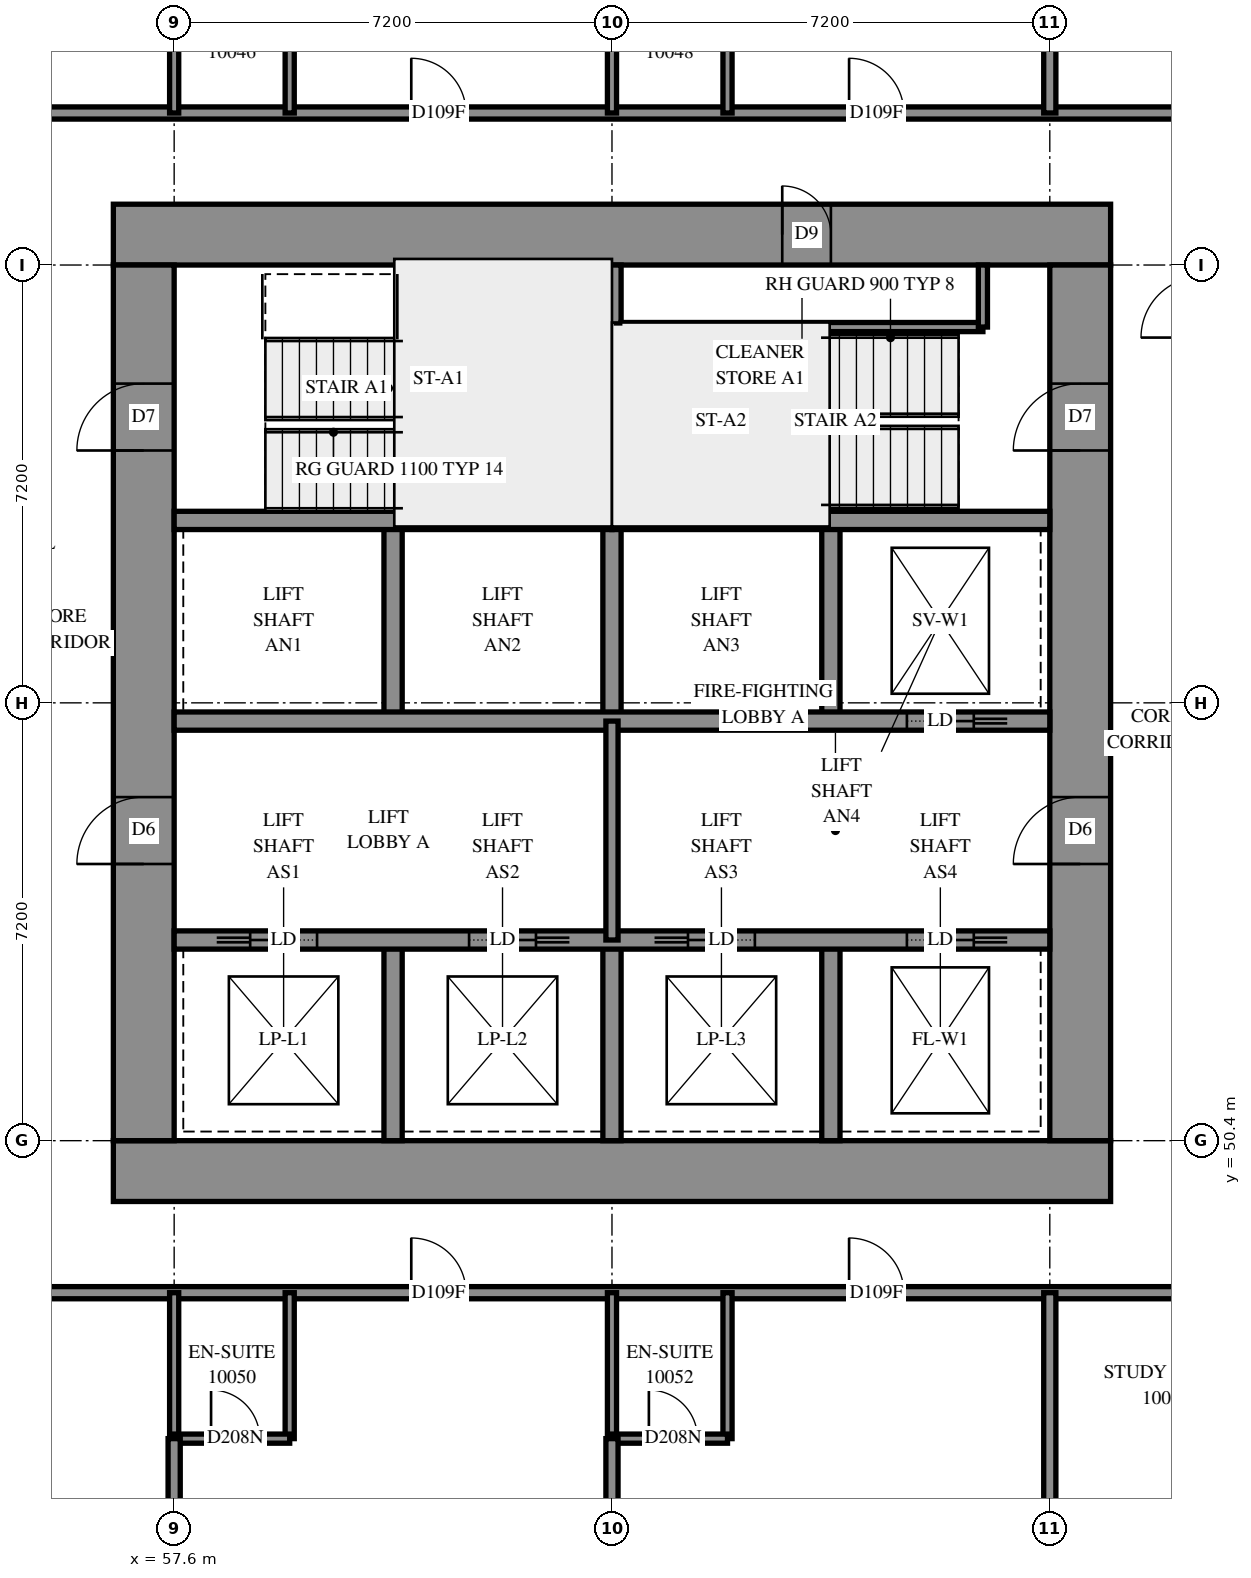
"""IFC4 building model, lengths in metres.
Left out: names, types, materials, properties, quantities, classifications, styles, units other than length and angle.
Written with IfcOpenShell. Run it as: python <this file> out.ifc"""

import sys

from ifc_helpers import new_model, si_unit, direction, frame, frame_2d, origin, place, context, subcontext, project, spatial, rectangle, extrude, element, fill, save


model = new_model("IFC4")
c1 = context("Model", 3, precision=1e-05, world=origin(), true_north=direction((0.0, 1.0)))
c2 = subcontext(c1, "Body", "Model", "MODEL_VIEW")
j1 = project(units=[si_unit("LENGTHUNIT", "METRE"), si_unit("PLANEANGLEUNIT", "RADIAN")], contexts=[c1])
p1 = place(None, origin())
s1 = spatial("IfcSite", under=j1, at=p1, CompositionType="ELEMENT")
p2 = place(p1, origin())
s2 = spatial("IfcBuilding", under=s1, at=p2, CompositionType="ELEMENT")
p3 = place(p2, frame((0.0, 0.0, 40.6)))
s3 = spatial("IfcBuildingStorey", under=s2, at=p3, CompositionType="ELEMENT", Elevation=40.6)
p4 = place(p3, frame((56.6, 49.9, -0.3), z_axis=(0.0, 0.0, 1.0), x_axis=(1.0, 0.0, 0.0)))
e1 = element("IfcWall", 1, at=p4, inside=s3, PredefinedType="SHEAR", context=c2, shape_type="SweptSolid", body=[
    extrude(rectangle(XDim=16.4, YDim=1.0, at=frame_2d((8.2, 0.0))), origin(), (0.0, 0.0, 1.0), 2.7),
])
p5 = place(p3, frame((56.6, 65.3, -0.3), z_axis=(0.0, 0.0, 1.0), x_axis=(1.0, 0.0, 0.0)))
e2 = element("IfcWall", 2, at=p5, inside=s3, PredefinedType="SHEAR", context=c2, shape_type="SweptSolid", body=[
    extrude(rectangle(XDim=16.4, YDim=1.0, at=frame_2d((8.2, 0.0))), origin(), (0.0, 0.0, 1.0), 2.7),
])
p6 = place(p5, frame((11.0, 0.0, 0.3)))
e3 = element("IfcOpeningElement", 3, at=p6, cuts=e2, PredefinedType="OPENING", context=c2, shape_type="SweptSolid", body=[
    extrude(rectangle(XDim=0.8, YDim=2.1, at=frame_2d((0.4, 1.05))), frame((0.0, 0.51, 0.0), z_axis=(0.0, -1.0, 0.0), x_axis=(1.0, 0.0, 0.0)), (0.0, 0.0, 1.0), 1.02),
])
p7 = place(p3, frame((57.1, 50.4, -0.3), z_axis=(0.0, 0.0, 1.0), x_axis=(0.0, 1.0, 0.0)))
e4 = element("IfcWall", 4, at=p7, inside=s3, PredefinedType="SHEAR", context=c2, shape_type="SweptSolid", body=[
    extrude(rectangle(XDim=14.4, YDim=1.0, at=frame_2d((7.2, 0.0))), origin(), (0.0, 0.0, 1.0), 2.7),
])
p8 = place(p7, frame((4.55, 0.0, 0.3)))
e5 = element("IfcOpeningElement", 5, at=p8, cuts=e4, PredefinedType="OPENING", context=c2, shape_type="SweptSolid", body=[
    extrude(rectangle(XDim=1.1, YDim=2.1, at=frame_2d((0.55, 1.05))), frame((0.0, 0.51, 0.0), z_axis=(0.0, -1.0, 0.0), x_axis=(1.0, 0.0, 0.0)), (0.0, 0.0, 1.0), 1.02),
])
p9 = place(p7, frame((11.35, 0.0, 0.3)))
e6 = element("IfcOpeningElement", 6, at=p9, cuts=e4, PredefinedType="OPENING", context=c2, shape_type="SweptSolid", body=[
    extrude(rectangle(XDim=1.1, YDim=2.1, at=frame_2d((0.55, 1.05))), frame((0.0, 0.51, 0.0), z_axis=(0.0, -1.0, 0.0), x_axis=(1.0, 0.0, 0.0)), (0.0, 0.0, 1.0), 1.02),
])
p10 = place(p3, frame((72.5, 50.4, -0.3), z_axis=(0.0, 0.0, 1.0), x_axis=(0.0, 1.0, 0.0)))
e7 = element("IfcWall", 7, at=p10, inside=s3, PredefinedType="SHEAR", context=c2, shape_type="SweptSolid", body=[
    extrude(rectangle(XDim=14.4, YDim=1.0, at=frame_2d((7.2, 0.0))), origin(), (0.0, 0.0, 1.0), 2.7),
])
p11 = place(p10, frame((4.55, 0.0, 0.3)))
e8 = element("IfcOpeningElement", 8, at=p11, cuts=e7, PredefinedType="OPENING", context=c2, shape_type="SweptSolid", body=[
    extrude(rectangle(XDim=1.1, YDim=2.1, at=frame_2d((0.55, 1.05))), frame((0.0, 0.51, 0.0), z_axis=(0.0, -1.0, 0.0), x_axis=(1.0, 0.0, 0.0)), (0.0, 0.0, 1.0), 1.02),
])
p12 = place(p10, frame((11.35, 0.0, 0.3)))
e9 = element("IfcOpeningElement", 9, at=p12, cuts=e7, PredefinedType="OPENING", context=c2, shape_type="SweptSolid", body=[
    extrude(rectangle(XDim=1.1, YDim=2.1, at=frame_2d((0.55, 1.05))), frame((0.0, 0.51, 0.0), z_axis=(0.0, -1.0, 0.0), x_axis=(1.0, 0.0, 0.0)), (0.0, 0.0, 1.0), 1.02),
])
for number, where, z_axis, x_axis in (
    (10, (61.2, 50.4, 0.0), (0.0, 0.0, 1.0), (0.0, 1.0, 0.0)),
    (11, (61.2, 57.3, 0.0), (0.0, 0.0, 1.0), (0.0, 1.0, 0.0)),
    (12, (64.8, 50.4, 0.0), (0.0, 0.0, 1.0), (0.0, 1.0, 0.0)),
    (13, (64.8, 57.3, 0.0), (0.0, 0.0, 1.0), (0.0, 1.0, 0.0)),
    (14, (68.4, 50.4, 0.0), (0.0, 0.0, 1.0), (0.0, 1.0, 0.0)),
    (15, (68.4, 57.3, 0.0), (0.0, 0.0, 1.0), (0.0, 1.0, 0.0)),
):
    element("IfcWall", number, at=place(p3, frame(where, z_axis=z_axis, x_axis=x_axis)), inside=s3, PredefinedType="SOLIDWALL", context=c2, shape_type="SweptSolid", body=[
        extrude(rectangle(XDim=3.3, YDim=0.3, at=frame_2d((1.65, 0.0))), origin(), (0.0, 0.0, 1.0), 3.1),
    ])
p13 = place(p3, frame((57.6, 53.7, 0.0), z_axis=(0.0, 0.0, 1.0), x_axis=(1.0, 0.0, 0.0)))
e16 = element("IfcWall", 16, at=p13, inside=s3, PredefinedType="SOLIDWALL", context=c2, shape_type="SweptSolid", body=[
    extrude(rectangle(XDim=14.4, YDim=0.3, at=frame_2d((7.2, 0.0))), origin(), (0.0, 0.0, 1.0), 3.1),
])
p14 = place(p13, frame((1.25, 0.0, 0.0)))
e17 = element("IfcOpeningElement", 17, at=p14, cuts=e16, PredefinedType="OPENING", context=c2, shape_type="SweptSolid", body=[
    extrude(rectangle(XDim=1.1, YDim=2.1, at=frame_2d((0.55, 1.05))), frame((0.0, 0.16, 0.0), z_axis=(0.0, -1.0, 0.0), x_axis=(1.0, 0.0, 0.0)), (0.0, 0.0, 1.0), 0.32),
])
p15 = place(p13, frame((4.85, 0.0, 0.0)))
e18 = element("IfcOpeningElement", 18, at=p15, cuts=e16, PredefinedType="OPENING", context=c2, shape_type="SweptSolid", body=[
    extrude(rectangle(XDim=1.1, YDim=2.1, at=frame_2d((0.55, 1.05))), frame((0.0, 0.16, 0.0), z_axis=(0.0, -1.0, 0.0), x_axis=(1.0, 0.0, 0.0)), (0.0, 0.0, 1.0), 0.32),
])
p16 = place(p13, frame((8.45, 0.0, 0.0)))
e19 = element("IfcOpeningElement", 19, at=p16, cuts=e16, PredefinedType="OPENING", context=c2, shape_type="SweptSolid", body=[
    extrude(rectangle(XDim=1.1, YDim=2.1, at=frame_2d((0.55, 1.05))), frame((0.0, 0.16, 0.0), z_axis=(0.0, -1.0, 0.0), x_axis=(1.0, 0.0, 0.0)), (0.0, 0.0, 1.0), 0.32),
])
p17 = place(p13, frame((12.05, 0.0, 0.0)))
e20 = element("IfcOpeningElement", 20, at=p17, cuts=e16, PredefinedType="OPENING", context=c2, shape_type="SweptSolid", body=[
    extrude(rectangle(XDim=1.1, YDim=2.1, at=frame_2d((0.55, 1.05))), frame((0.0, 0.16, 0.0), z_axis=(0.0, -1.0, 0.0), x_axis=(1.0, 0.0, 0.0)), (0.0, 0.0, 1.0), 0.32),
])
p18 = place(p3, frame((57.6, 57.3, 0.0), z_axis=(0.0, 0.0, 1.0), x_axis=(1.0, 0.0, 0.0)))
e21 = element("IfcWall", 21, at=p18, inside=s3, PredefinedType="SOLIDWALL", context=c2, shape_type="SweptSolid", body=[
    extrude(rectangle(XDim=14.4, YDim=0.3, at=frame_2d((7.2, 0.0))), origin(), (0.0, 0.0, 1.0), 3.1),
])
p19 = place(p18, frame((12.05, 0.0, 0.0)))
e22 = element("IfcOpeningElement", 22, at=p19, cuts=e21, PredefinedType="OPENING", context=c2, shape_type="SweptSolid", body=[
    extrude(rectangle(XDim=1.1, YDim=2.1, at=frame_2d((0.55, 1.05))), frame((0.0, 0.16, 0.0), z_axis=(0.0, -1.0, 0.0), x_axis=(1.0, 0.0, 0.0)), (0.0, 0.0, 1.0), 0.32),
])
for number, where, z_axis, x_axis in (
    (23, (57.6, 60.6, 0.0), (0.0, 0.0, 1.0), (1.0, 0.0, 0.0)),
    (24, (64.8, 60.6, 0.0), (0.0, 0.0, 1.0), (1.0, 0.0, 0.0)),
):
    element("IfcWall", number, at=place(p3, frame(where, z_axis=z_axis, x_axis=x_axis)), inside=s3, PredefinedType="SOLIDWALL", context=c2, shape_type="SweptSolid", body=[
        extrude(rectangle(XDim=7.2, YDim=0.3, at=frame_2d((3.6, 0.0))), origin(), (0.0, 0.0, 1.0), 3.1),
    ])
p20 = place(p3, frame((64.8, 60.6, 0.0), z_axis=(0.0, 0.0, 1.0), x_axis=(0.0, 1.0, 0.0)))
e25 = element("IfcWall", 25, at=p20, inside=s3, PredefinedType="SOLIDWALL", context=c2, shape_type="SweptSolid", body=[
    extrude(rectangle(XDim=4.2, YDim=0.3, at=frame_2d((2.1, 0.0))), origin(), (0.0, 0.0, 1.0), 3.1),
])
p21 = place(p3, frame((64.95, 63.78, 0.0), z_axis=(0.0, 0.0, 1.0), x_axis=(1.0, 0.0, 0.0)))
e26 = element("IfcWall", 26, at=p21, inside=s3, PredefinedType="PARTITIONING", context=c2, shape_type="SweptSolid", body=[
    extrude(rectangle(XDim=5.95, YDim=0.15, at=frame_2d((2.975, 0.0))), origin(), (0.0, 0.0, 1.0), 3.1),
])
p22 = place(p3, frame((70.9, 63.78, 0.0), z_axis=(0.0, 0.0, 1.0), x_axis=(0.0, 1.0, 0.0)))
e27 = element("IfcWall", 27, at=p22, inside=s3, PredefinedType="PARTITIONING", context=c2, shape_type="SweptSolid", body=[
    extrude(rectangle(XDim=1.02, YDim=0.15, at=frame_2d((0.51, 0.0))), origin(), (0.0, 0.0, 1.0), 3.1),
])
p23 = place(p3, frame((64.8, 53.7, 0.0), z_axis=(0.0, 0.0, 1.0), x_axis=(0.0, 1.0, 0.0)))
e28 = element("IfcWall", 28, at=p23, inside=s3, PredefinedType="PARTITIONING", context=c2, shape_type="SweptSolid", body=[
    extrude(rectangle(XDim=3.6, YDim=0.2, at=frame_2d((1.8, 0.0))), origin(), (0.0, 0.0, 1.0), 3.1),
])
p24 = place(p3, frame((55.1, 67.3, 0.0), z_axis=(0.0, 0.0, 1.0), x_axis=(1.0, 0.0, 0.0)))
e29 = element("IfcWall", 29, at=p24, inside=s3, PredefinedType="PARTITIONING", context=c2, shape_type="SweptSolid", body=[
    extrude(rectangle(XDim=19.4, YDim=0.2, at=frame_2d((9.7, 0.0))), origin(), (0.0, 0.0, 1.0), 3.1),
])
p25 = place(p24, frame((6.399, 0.0, 0.0)))
e30 = element("IfcOpeningElement", 30, at=p25, cuts=e29, PredefinedType="OPENING", context=c2, shape_type="SweptSolid", body=[
    extrude(rectangle(XDim=0.9, YDim=2.1, at=frame_2d((0.45, 1.05))), frame((0.0, 0.11, 0.0), z_axis=(0.0, -1.0, 0.0), x_axis=(1.0, 0.0, 0.0)), (0.0, 0.0, 1.0), 0.22),
])
p26 = place(p24, frame((13.599, 0.0, 0.0)))
e31 = element("IfcOpeningElement", 31, at=p26, cuts=e29, PredefinedType="OPENING", context=c2, shape_type="SweptSolid", body=[
    extrude(rectangle(XDim=0.9, YDim=2.1, at=frame_2d((0.45, 1.05))), frame((0.0, 0.11, 0.0), z_axis=(0.0, -1.0, 0.0), x_axis=(1.0, 0.0, 0.0)), (0.0, 0.0, 1.0), 0.22),
])
p27 = place(p3, frame((55.1, 47.9, 0.0), z_axis=(0.0, 0.0, 1.0), x_axis=(1.0, 0.0, 0.0)))
e32 = element("IfcWall", 32, at=p27, inside=s3, PredefinedType="PARTITIONING", context=c2, shape_type="SweptSolid", body=[
    extrude(rectangle(XDim=19.204, YDim=0.2, at=frame_2d((9.602, 0.0))), origin(), (0.0, 0.0, 1.0), 3.1),
])
p28 = place(p27, frame((6.399, 0.0, 0.0)))
e33 = element("IfcOpeningElement", 33, at=p28, cuts=e32, PredefinedType="OPENING", context=c2, shape_type="SweptSolid", body=[
    extrude(rectangle(XDim=0.9, YDim=2.1, at=frame_2d((0.45, 1.05))), frame((0.0, 0.11, 0.0), z_axis=(0.0, -1.0, 0.0), x_axis=(1.0, 0.0, 0.0)), (0.0, 0.0, 1.0), 0.22),
])
p29 = place(p27, frame((13.599, 0.0, 0.0)))
e34 = element("IfcOpeningElement", 34, at=p29, cuts=e32, PredefinedType="OPENING", context=c2, shape_type="SweptSolid", body=[
    extrude(rectangle(XDim=0.9, YDim=2.1, at=frame_2d((0.45, 1.05))), frame((0.0, 0.11, 0.0), z_axis=(0.0, -1.0, 0.0), x_axis=(1.0, 0.0, 0.0)), (0.0, 0.0, 1.0), 0.22),
])
for number, where, z_axis, x_axis in (
    (35, (72.0, 67.3, 0.0), (0.0, 0.0, 1.0), (0.0, 1.0, 0.0)),
    (36, (72.0, 43.8, 0.0), (0.0, 0.0, 1.0), (0.0, 1.0, 0.0)),
):
    element("IfcWall", number, at=place(p3, frame(where, z_axis=z_axis, x_axis=x_axis)), inside=s3, PredefinedType="PARTITIONING", context=c2, shape_type="SweptSolid", body=[
        extrude(rectangle(XDim=4.1, YDim=0.2, at=frame_2d((2.05, 0.0))), origin(), (0.0, 0.0, 1.0), 3.1),
    ])
for number, where, z_axis, x_axis in (
    (37, (59.5, 67.3, 0.0), (0.0, 0.0, 1.0), (0.0, 1.0, 0.0)),
    (38, (57.6, 67.3, 0.0), (0.0, 0.0, 1.0), (0.0, 1.0, 0.0)),
    (39, (66.7, 67.3, 0.0), (0.0, 0.0, 1.0), (0.0, 1.0, 0.0)),
    (40, (64.8, 67.3, 0.0), (0.0, 0.0, 1.0), (0.0, 1.0, 0.0)),
    (41, (59.5, 45.5, 0.0), (0.0, 0.0, 1.0), (0.0, 1.0, 0.0)),
    (42, (57.6, 45.5, 0.0), (0.0, 0.0, 1.0), (0.0, 1.0, 0.0)),
    (43, (66.7, 45.5, 0.0), (0.0, 0.0, 1.0), (0.0, 1.0, 0.0)),
    (44, (64.8, 45.5, 0.0), (0.0, 0.0, 1.0), (0.0, 1.0, 0.0)),
):
    element("IfcWall", number, at=place(p3, frame(where, z_axis=z_axis, x_axis=x_axis)), inside=s3, PredefinedType="PARTITIONING", context=c2, shape_type="SweptSolid", body=[
        extrude(rectangle(XDim=2.4, YDim=0.15, at=frame_2d((1.2, 0.0))), origin(), (0.0, 0.0, 1.0), 3.1),
    ])
p30 = place(p3, frame((64.8, 45.5, 0.0), z_axis=(0.0, 0.0, 1.0), x_axis=(1.0, 0.0, 0.0)))
e45 = element("IfcWall", 45, at=p30, inside=s3, PredefinedType="PARTITIONING", context=c2, shape_type="SweptSolid", body=[
    extrude(rectangle(XDim=1.9, YDim=0.15, at=frame_2d((0.95, 0.0))), origin(), (0.0, 0.0, 1.0), 3.1),
])
p31 = place(p30, frame((0.607, 0.0, 0.0)))
e46 = element("IfcOpeningElement", 46, at=p31, cuts=e45, PredefinedType="OPENING", context=c2, shape_type="SweptSolid", body=[
    extrude(rectangle(XDim=0.8, YDim=2.1, at=frame_2d((0.4, 1.05))), frame((0.0, 0.085, 0.0), z_axis=(0.0, -1.0, 0.0), x_axis=(1.0, 0.0, 0.0)), (0.0, 0.0, 1.0), 0.17),
])
p32 = place(p3, frame((57.6, 45.5, 0.0), z_axis=(0.0, 0.0, 1.0), x_axis=(1.0, 0.0, 0.0)))
e47 = element("IfcWall", 47, at=p32, inside=s3, PredefinedType="PARTITIONING", context=c2, shape_type="SweptSolid", body=[
    extrude(rectangle(XDim=1.9, YDim=0.15, at=frame_2d((0.95, 0.0))), origin(), (0.0, 0.0, 1.0), 3.1),
])
p33 = place(p32, frame((0.607, 0.0, 0.0)))
e48 = element("IfcOpeningElement", 48, at=p33, cuts=e47, PredefinedType="OPENING", context=c2, shape_type="SweptSolid", body=[
    extrude(rectangle(XDim=0.8, YDim=2.1, at=frame_2d((0.4, 1.05))), frame((0.0, 0.085, 0.0), z_axis=(0.0, -1.0, 0.0), x_axis=(1.0, 0.0, 0.0)), (0.0, 0.0, 1.0), 0.17),
])
for number, where, z_axis, x_axis in (
    (49, (57.6, 43.8, 0.0), (0.0, 0.0, 1.0), (0.0, 1.0, 0.0)),
    (50, (64.8, 43.8, 0.0), (0.0, 0.0, 1.0), (0.0, 1.0, 0.0)),
):
    element("IfcWall", number, at=place(p3, frame(where, z_axis=z_axis, x_axis=x_axis)), inside=s3, PredefinedType="PARTITIONING", context=c2, shape_type="SweptSolid", body=[
        extrude(rectangle(XDim=1.7, YDim=0.2, at=frame_2d((0.85, 0.0))), origin(), (0.0, 0.0, 1.0), 3.1),
    ])
p34 = place(p6, origin())
e51 = element("IfcDoor", 51, at=p34, inside=s3, OperationType="SINGLE_SWING_RIGHT", PredefinedType="DOOR", context=c2, shape_type="SweptSolid", body=[
    extrude(rectangle(XDim=0.8, YDim=2.1, at=frame_2d((0.4, 1.05))), frame((0.0, -0.44, 0.0), z_axis=(0.0, -1.0, 0.0), x_axis=(1.0, 0.0, 0.0)), (0.0, 0.0, 1.0), 0.05),
])
fill(e3, e51)
p35 = place(p8, origin())
e52 = element("IfcDoor", 52, at=p35, inside=s3, OperationType="DOUBLE_DOOR_SINGLE_SWING", PredefinedType="DOOR", context=c2, shape_type="SweptSolid", body=[
    extrude(rectangle(XDim=1.1, YDim=2.1, at=frame_2d((0.55, 1.05))), frame((0.0, 0.025, 0.0), z_axis=(0.0, -1.0, 0.0), x_axis=(1.0, 0.0, 0.0)), (0.0, 0.0, 1.0), 0.05),
])
fill(e5, e52)
p36 = place(p11, origin())
e53 = element("IfcDoor", 53, at=p36, inside=s3, OperationType="DOUBLE_DOOR_SINGLE_SWING", PredefinedType="DOOR", context=c2, shape_type="SweptSolid", body=[
    extrude(rectangle(XDim=1.1, YDim=2.1, at=frame_2d((0.55, 1.05))), frame((0.0, 0.025, 0.0), z_axis=(0.0, -1.0, 0.0), x_axis=(1.0, 0.0, 0.0)), (0.0, 0.0, 1.0), 0.05),
])
fill(e8, e53)
p37 = place(p9, origin())
e54 = element("IfcDoor", 54, at=p37, inside=s3, OperationType="SINGLE_SWING_LEFT", PredefinedType="DOOR", context=c2, shape_type="SweptSolid", body=[
    extrude(rectangle(XDim=1.1, YDim=2.1, at=frame_2d((0.55, 1.05))), frame((0.0, 0.025, 0.0), z_axis=(0.0, -1.0, 0.0), x_axis=(1.0, 0.0, 0.0)), (0.0, 0.0, 1.0), 0.05),
])
fill(e6, e54)
p38 = place(p12, origin())
e55 = element("IfcDoor", 55, at=p38, inside=s3, OperationType="SINGLE_SWING_RIGHT", PredefinedType="DOOR", context=c2, shape_type="SweptSolid", body=[
    extrude(rectangle(XDim=1.1, YDim=2.1, at=frame_2d((0.55, 1.05))), frame((0.0, 0.025, 0.0), z_axis=(0.0, -1.0, 0.0), x_axis=(1.0, 0.0, 0.0)), (0.0, 0.0, 1.0), 0.05),
])
fill(e9, e55)
p39 = place(p14, origin())
e56 = element("IfcDoor", 56, at=p39, inside=s3, OperationType="SLIDING_TO_LEFT", PredefinedType="DOOR", context=c2, shape_type="SweptSolid", body=[
    extrude(rectangle(XDim=1.1, YDim=2.1, at=frame_2d((0.55, 1.05))), frame((0.0, 0.025, 0.0), z_axis=(0.0, -1.0, 0.0), x_axis=(1.0, 0.0, 0.0)), (0.0, 0.0, 1.0), 0.05),
])
fill(e17, e56)
p40 = place(p15, origin())
e57 = element("IfcDoor", 57, at=p40, inside=s3, OperationType="SLIDING_TO_RIGHT", PredefinedType="DOOR", context=c2, shape_type="SweptSolid", body=[
    extrude(rectangle(XDim=1.1, YDim=2.1, at=frame_2d((0.55, 1.05))), frame((0.0, 0.025, 0.0), z_axis=(0.0, -1.0, 0.0), x_axis=(1.0, 0.0, 0.0)), (0.0, 0.0, 1.0), 0.05),
])
fill(e18, e57)
p41 = place(p16, origin())
e58 = element("IfcDoor", 58, at=p41, inside=s3, OperationType="SLIDING_TO_LEFT", PredefinedType="DOOR", context=c2, shape_type="SweptSolid", body=[
    extrude(rectangle(XDim=1.1, YDim=2.1, at=frame_2d((0.55, 1.05))), frame((0.0, 0.025, 0.0), z_axis=(0.0, -1.0, 0.0), x_axis=(1.0, 0.0, 0.0)), (0.0, 0.0, 1.0), 0.05),
])
fill(e19, e58)
p42 = place(p17, origin())
e59 = element("IfcDoor", 59, at=p42, inside=s3, OperationType="SLIDING_TO_RIGHT", PredefinedType="DOOR", context=c2, shape_type="SweptSolid", body=[
    extrude(rectangle(XDim=1.1, YDim=2.1, at=frame_2d((0.55, 1.05))), frame((0.0, 0.025, 0.0), z_axis=(0.0, -1.0, 0.0), x_axis=(1.0, 0.0, 0.0)), (0.0, 0.0, 1.0), 0.05),
])
fill(e20, e59)
p43 = place(p19, origin())
e60 = element("IfcDoor", 60, at=p43, inside=s3, OperationType="SLIDING_TO_RIGHT", PredefinedType="DOOR", context=c2, shape_type="SweptSolid", body=[
    extrude(rectangle(XDim=1.1, YDim=2.1, at=frame_2d((0.55, 1.05))), frame((0.0, 0.025, 0.0), z_axis=(0.0, -1.0, 0.0), x_axis=(1.0, 0.0, 0.0)), (0.0, 0.0, 1.0), 0.05),
])
fill(e22, e60)
p44 = place(p25, origin())
e61 = element("IfcDoor", 61, at=p44, inside=s3, OperationType="SINGLE_SWING_RIGHT", PredefinedType="DOOR", context=c2, shape_type="SweptSolid", body=[
    extrude(rectangle(XDim=0.9, YDim=2.1, at=frame_2d((0.45, 1.05))), frame((0.0, 0.025, 0.0), z_axis=(0.0, -1.0, 0.0), x_axis=(1.0, 0.0, 0.0)), (0.0, 0.0, 1.0), 0.05),
])
fill(e30, e61)
p45 = place(p26, origin())
e62 = element("IfcDoor", 62, at=p45, inside=s3, OperationType="SINGLE_SWING_RIGHT", PredefinedType="DOOR", context=c2, shape_type="SweptSolid", body=[
    extrude(rectangle(XDim=0.9, YDim=2.1, at=frame_2d((0.45, 1.05))), frame((0.0, 0.025, 0.0), z_axis=(0.0, -1.0, 0.0), x_axis=(1.0, 0.0, 0.0)), (0.0, 0.0, 1.0), 0.05),
])
fill(e31, e62)
p46 = place(p28, origin())
e63 = element("IfcDoor", 63, at=p46, inside=s3, OperationType="SINGLE_SWING_LEFT", PredefinedType="DOOR", context=c2, shape_type="SweptSolid", body=[
    extrude(rectangle(XDim=0.9, YDim=2.1, at=frame_2d((0.45, 1.05))), frame((0.0, 0.025, 0.0), z_axis=(0.0, -1.0, 0.0), x_axis=(1.0, 0.0, 0.0)), (0.0, 0.0, 1.0), 0.05),
])
fill(e33, e63)
p47 = place(p33, origin())
e64 = element("IfcDoor", 64, at=p47, inside=s3, OperationType="SINGLE_SWING_RIGHT", PredefinedType="DOOR", context=c2, shape_type="SweptSolid", body=[
    extrude(rectangle(XDim=0.8, YDim=2.1, at=frame_2d((0.4, 1.05))), frame((0.0, 0.025, 0.0), z_axis=(0.0, -1.0, 0.0), x_axis=(1.0, 0.0, 0.0)), (0.0, 0.0, 1.0), 0.05),
])
fill(e48, e64)
p48 = place(p29, origin())
e65 = element("IfcDoor", 65, at=p48, inside=s3, OperationType="SINGLE_SWING_LEFT", PredefinedType="DOOR", context=c2, shape_type="SweptSolid", body=[
    extrude(rectangle(XDim=0.9, YDim=2.1, at=frame_2d((0.45, 1.05))), frame((0.0, 0.025, 0.0), z_axis=(0.0, -1.0, 0.0), x_axis=(1.0, 0.0, 0.0)), (0.0, 0.0, 1.0), 0.05),
])
fill(e34, e65)
p49 = place(p31, origin())
e66 = element("IfcDoor", 66, at=p49, inside=s3, OperationType="SINGLE_SWING_RIGHT", PredefinedType="DOOR", context=c2, shape_type="SweptSolid", body=[
    extrude(rectangle(XDim=0.8, YDim=2.1, at=frame_2d((0.4, 1.05))), frame((0.0, 0.025, 0.0), z_axis=(0.0, -1.0, 0.0), x_axis=(1.0, 0.0, 0.0)), (0.0, 0.0, 1.0), 0.05),
])
fill(e46, e66)
save(model, sys.argv[1])
